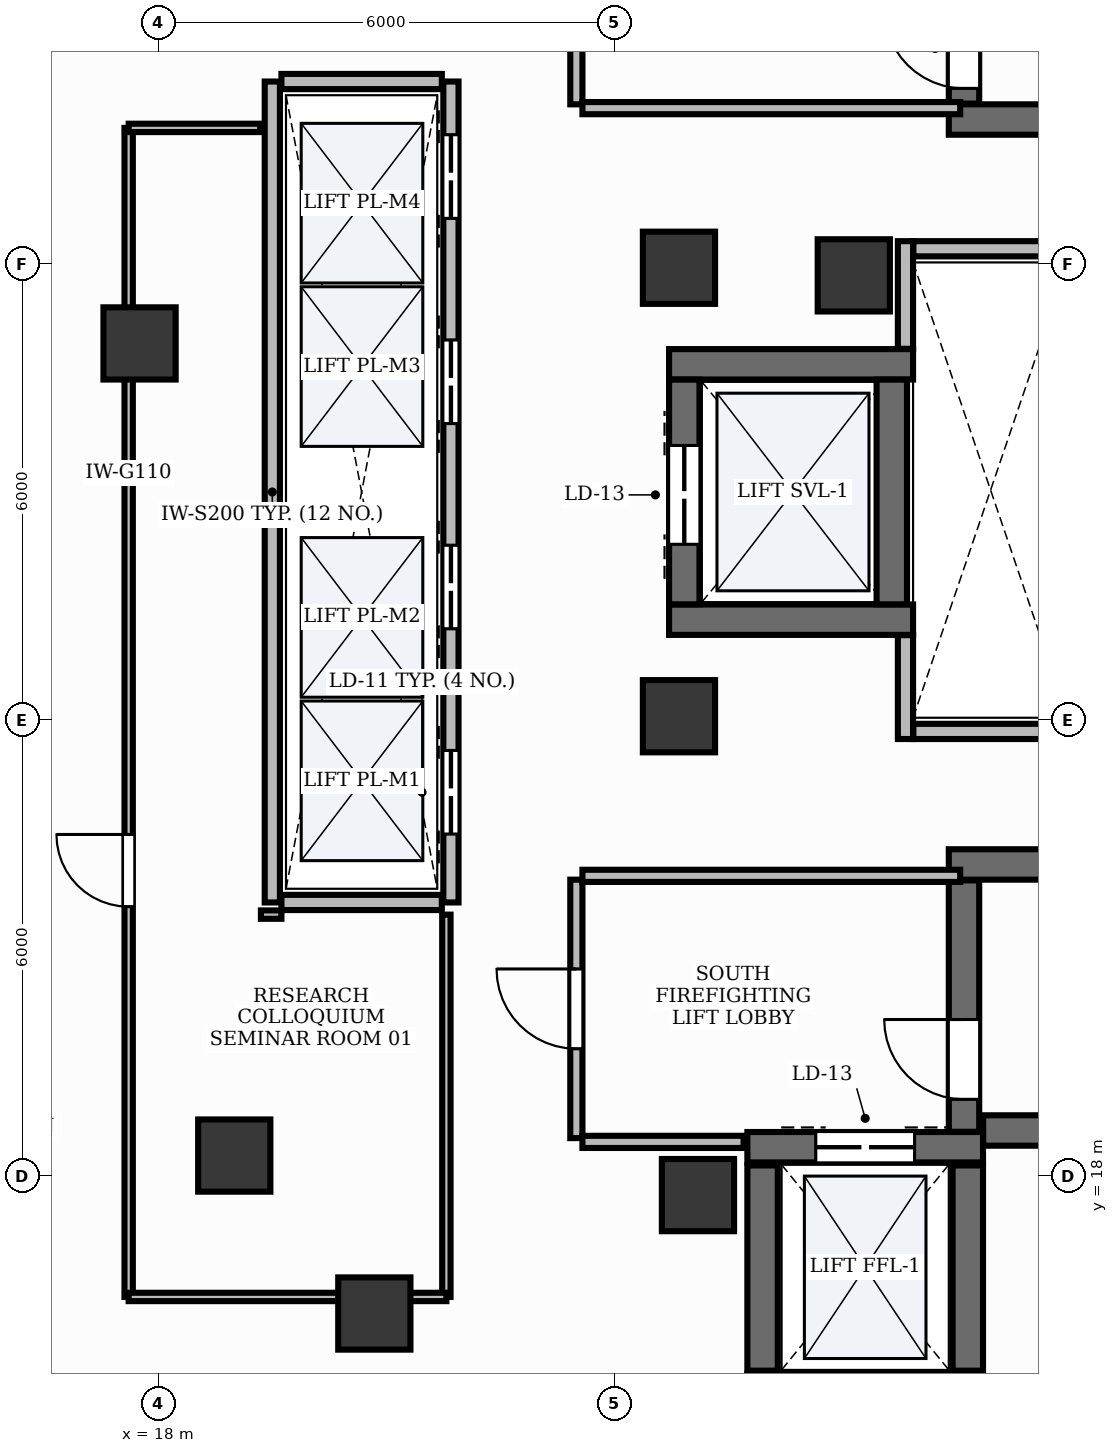
"""IFC4 building model, lengths in metres.
Left out: names, types, materials, properties, quantities, classifications, styles, units other than length and angle.
Written with IfcOpenShell. Run it as: python <this file> out.ifc"""

import sys

from ifc_helpers import new_model, si_unit, direction, frame, frame_2d, origin, origin_2d, place, context, subcontext, project, spatial, rectangle, extrude, element, fill, save


model = new_model("IFC4")
c1 = context("Model", 3, precision=1e-05, world=origin(), true_north=direction((0.0, 1.0)))
c2 = subcontext(c1, "Body", "Model", "MODEL_VIEW")
j1 = project(units=[si_unit("LENGTHUNIT", "METRE"), si_unit("PLANEANGLEUNIT", "RADIAN")], contexts=[c1])
p1 = place(None, origin())
s1 = spatial("IfcSite", under=j1, at=p1, CompositionType="ELEMENT")
p2 = place(p1, origin())
s2 = spatial("IfcBuilding", under=s1, at=p2, CompositionType="ELEMENT")
p3 = place(p2, frame((0.0, 0.0, 171.0)))
s3 = spatial("IfcBuildingStorey", under=s2, at=p3, CompositionType="ELEMENT", Elevation=171.0)
p4 = place(p3, frame((28.4, 31.9, 0.0), z_axis=(0.0, 0.0, 1.0), x_axis=(1.0, 0.0, 0.0)))
e1 = element("IfcWall", 1, at=p4, inside=s3, PredefinedType="SHEAR", context=c2, shape_type="SweptSolid", body=[
    extrude(rectangle(XDim=8.65, YDim=0.4, at=frame_2d((4.325, 0.0))), origin(), (0.0, 0.0, 1.0), 3.9),
])
p5 = place(p3, frame((28.6, 32.11, 0.0), z_axis=(0.0, 0.0, 1.0), x_axis=(0.0, 1.0, 0.0)))
e2 = element("IfcWall", 2, at=p5, inside=s3, PredefinedType="SHEAR", context=c2, shape_type="SweptSolid", body=[
    extrude(rectangle(XDim=3.308, YDim=0.4, at=frame_2d((1.654, 0.0))), origin(), (0.0, 0.0, 1.0), 3.9),
])
p6 = place(p5, frame((0.2, 0.0, 0.0)))
e3 = element("IfcOpeningElement", 3, at=p6, cuts=e2, PredefinedType="OPENING", context=c2, shape_type="SweptSolid", body=[
    extrude(rectangle(XDim=1.05, YDim=2.15, at=frame_2d((0.525, 1.075))), frame((0.0, 0.215, 0.0), z_axis=(0.0, -1.0, 0.0), x_axis=(1.0, 0.0, 0.0)), (0.0, 0.0, 1.0), 0.43),
])
p7 = place(p3, frame((28.852, 18.6, 0.0), z_axis=(0.0, 0.0, 1.0), x_axis=(1.0, 0.0, 0.0)))
e4 = element("IfcWall", 4, at=p7, inside=s3, PredefinedType="SHEAR", context=c2, shape_type="SweptSolid", body=[
    extrude(rectangle(XDim=8.198, YDim=0.4, at=frame_2d((4.099, 0.0))), origin(), (0.0, 0.0, 1.0), 3.9),
])
p8 = place(p3, frame((28.4, 22.1, 0.0), z_axis=(0.0, 0.0, 1.0), x_axis=(1.0, 0.0, 0.0)))
e5 = element("IfcWall", 5, at=p8, inside=s3, PredefinedType="SHEAR", context=c2, shape_type="SweptSolid", body=[
    extrude(rectangle(XDim=8.65, YDim=0.4, at=frame_2d((4.325, 0.0))), origin(), (0.0, 0.0, 1.0), 3.9),
])
p9 = place(p3, frame((28.6, 18.582, 0.0), z_axis=(0.0, 0.0, 1.0), x_axis=(0.0, 1.0, 0.0)))
e6 = element("IfcWall", 6, at=p9, inside=s3, PredefinedType="SHEAR", context=c2, shape_type="SweptSolid", body=[
    extrude(rectangle(XDim=3.308, YDim=0.4, at=frame_2d((1.654, 0.0))), origin(), (0.0, 0.0, 1.0), 3.9),
])
p10 = place(p9, frame((0.428, 0.0, 0.0)))
e7 = element("IfcOpeningElement", 7, at=p10, cuts=e6, PredefinedType="OPENING", context=c2, shape_type="SweptSolid", body=[
    extrude(rectangle(XDim=1.05, YDim=2.15, at=frame_2d((0.525, 1.075))), frame((0.0, 0.215, 0.0), z_axis=(0.0, -1.0, 0.0), x_axis=(1.0, 0.0, 0.0)), (0.0, 0.0, 1.0), 0.43),
])
p11 = place(p3, frame((25.75, 18.38, 0.0), z_axis=(0.0, 0.0, 1.0), x_axis=(1.0, 0.0, 0.0)))
e8 = element("IfcWall", 8, at=p11, inside=s3, PredefinedType="SHEAR", context=c2, shape_type="SweptSolid", body=[
    extrude(rectangle(XDim=3.1, YDim=0.4, at=frame_2d((1.55, 0.0))), origin(), (0.0, 0.0, 1.0), 3.9),
])
p12 = place(p11, frame((0.9, 0.0, 0.0)))
e9 = element("IfcOpeningElement", 9, at=p12, cuts=e8, PredefinedType="OPENING", context=c2, shape_type="SweptSolid", body=[
    extrude(rectangle(XDim=1.3, YDim=2.2, at=frame_2d((0.65, 1.1))), frame((0.0, 0.215, 0.0), z_axis=(0.0, -1.0, 0.0), x_axis=(1.0, 0.0, 0.0)), (0.0, 0.0, 1.0), 0.43),
])
for number, where, z_axis, x_axis in (
    (10, (25.95, 15.44, 0.0), (0.0, 0.0, 1.0), (0.0, 1.0, 0.0)),
    (11, (28.65, 15.44, 0.0), (0.0, 0.0, 1.0), (0.0, 1.0, 0.0)),
):
    element("IfcWall", number, at=place(p3, frame(where, z_axis=z_axis, x_axis=x_axis)), inside=s3, PredefinedType="SHEAR", context=c2, shape_type="SweptSolid", body=[
        extrude(rectangle(XDim=2.7, YDim=0.4, at=frame_2d((1.35, 0.0))), origin(), (0.0, 0.0, 1.0), 3.9),
    ])
for number, where, z_axis, x_axis in (
    (12, (24.72, 28.68, 0.0), (0.0, 0.0, 1.0), (1.0, 0.0, 0.0)),
    (13, (24.72, 25.32, 0.0), (0.0, 0.0, 1.0), (1.0, 0.0, 0.0)),
):
    element("IfcWall", number, at=place(p3, frame(where, z_axis=z_axis, x_axis=x_axis)), inside=s3, PredefinedType="SHEAR", context=c2, shape_type="SweptSolid", body=[
        extrude(rectangle(XDim=3.21, YDim=0.4, at=frame_2d((1.605, 0.0))), origin(), (0.0, 0.0, 1.0), 3.9),
    ])
p13 = place(p3, frame((24.92, 25.522, 0.0), z_axis=(0.0, 0.0, 1.0), x_axis=(0.0, 1.0, 0.0)))
e14 = element("IfcWall", 14, at=p13, inside=s3, PredefinedType="SHEAR", context=c2, shape_type="SweptSolid", body=[
    extrude(rectangle(XDim=2.956, YDim=0.4, at=frame_2d((1.478, 0.0))), origin(), (0.0, 0.0, 1.0), 3.9),
])
p14 = place(p13, frame((0.79, 0.0, 0.0)))
e15 = element("IfcOpeningElement", 15, at=p14, cuts=e14, PredefinedType="OPENING", context=c2, shape_type="SweptSolid", body=[
    extrude(rectangle(XDim=1.3, YDim=2.2, at=frame_2d((0.65, 1.1))), frame((0.0, 0.215, 0.0), z_axis=(0.0, -1.0, 0.0), x_axis=(1.0, 0.0, 0.0)), (0.0, 0.0, 1.0), 0.43),
])
p15 = place(p3, frame((27.65, 25.522, 0.0), z_axis=(0.0, 0.0, 1.0), x_axis=(0.0, 1.0, 0.0)))
e16 = element("IfcWall", 16, at=p15, inside=s3, PredefinedType="SHEAR", context=c2, shape_type="SweptSolid", body=[
    extrude(rectangle(XDim=2.956, YDim=0.4, at=frame_2d((1.478, 0.0))), origin(), (0.0, 0.0, 1.0), 3.9),
])
for number, where, z_axis, x_axis in (
    (17, (24.85, 29.95, -0.0), (0.0, 0.0, 1.0), (1.0, 0.0, 0.0)),
    (18, (27.15, 29.85, -0.0), (0.0, 0.0, 1.0), (1.0, 0.0, 0.0)),
    (19, (24.85, 24.05, -0.0), (0.0, 0.0, 1.0), (1.0, 0.0, 0.0)),
    (20, (25.1, 17.75, -0.0), (0.0, 0.0, 1.0), (1.0, 0.0, 0.0)),
):
    element("IfcColumn", number, at=place(p3, frame(where, z_axis=z_axis, x_axis=x_axis)), inside=s3, PredefinedType="PILASTER", context=c2, shape_type="SweptSolid", body=[
        extrude(rectangle(XDim=0.95, YDim=0.95, at=origin_2d()), origin(), (0.0, 0.0, 1.0), 3.901),
    ])
for number, where, z_axis, x_axis in (
    (21, (17.753, 28.955, -0.0), (0.0, 0.0, 1.0), (1.0, 0.0, 0.0)),
    (22, (19.0, 18.27, -0.0), (0.0, 0.0, 1.0), (1.0, 0.0, 0.0)),
    (23, (20.842, 16.192, -0.0), (0.0, 0.0, 1.0), (1.0, 0.0, 0.0)),
):
    element("IfcColumn", number, at=place(p3, frame(where, z_axis=z_axis, x_axis=x_axis)), inside=s3, PredefinedType="COLUMN", context=c2, shape_type="SweptSolid", body=[
        extrude(rectangle(XDim=0.95, YDim=0.95, at=origin_2d()), origin(), (0.0, 0.0, 1.0), 3.901),
    ])
p16 = place(p3, frame((19.5, 21.6, 0.0), z_axis=(0.0, 0.0, 1.0), x_axis=(0.0, 1.0, 0.0)))
e24 = element("IfcWall", 24, at=p16, inside=s3, PredefinedType="PARTITIONING", context=c2, shape_type="SweptSolid", body=[
    extrude(rectangle(XDim=10.8, YDim=0.2, at=frame_2d((5.4, 0.0))), origin(), (0.0, 0.0, 1.0), 2.91),
])
p17 = place(p3, frame((21.85, 21.6, 0.0), z_axis=(0.0, 0.0, 1.0), x_axis=(0.0, 1.0, 0.0)))
e25 = element("IfcWall", 25, at=p17, inside=s3, PredefinedType="PARTITIONING", context=c2, shape_type="SweptSolid", body=[
    extrude(rectangle(XDim=10.8, YDim=0.2, at=frame_2d((5.4, 0.0))), origin(), (0.0, 0.0, 1.0), 2.91),
])
p18 = place(p17, frame((0.9, 0.0, 0.0)))
e26 = element("IfcOpeningElement", 26, at=p18, cuts=e25, PredefinedType="OPENING", context=c2, shape_type="SweptSolid", body=[
    extrude(rectangle(XDim=1.1, YDim=2.2, at=frame_2d((0.55, 1.1))), frame((0.0, 0.115, 0.0), z_axis=(0.0, -1.0, 0.0), x_axis=(1.0, 0.0, 0.0)), (0.0, 0.0, 1.0), 0.23),
])
p19 = place(p17, frame((3.6, 0.0, 0.0)))
e27 = element("IfcOpeningElement", 27, at=p19, cuts=e25, PredefinedType="OPENING", context=c2, shape_type="SweptSolid", body=[
    extrude(rectangle(XDim=1.1, YDim=2.2, at=frame_2d((0.55, 1.1))), frame((0.0, 0.115, 0.0), z_axis=(0.0, -1.0, 0.0), x_axis=(1.0, 0.0, 0.0)), (0.0, 0.0, 1.0), 0.23),
])
p20 = place(p17, frame((6.3, 0.0, 0.0)))
e28 = element("IfcOpeningElement", 28, at=p20, cuts=e25, PredefinedType="OPENING", context=c2, shape_type="SweptSolid", body=[
    extrude(rectangle(XDim=1.1, YDim=2.2, at=frame_2d((0.55, 1.1))), frame((0.0, 0.115, 0.0), z_axis=(0.0, -1.0, 0.0), x_axis=(1.0, 0.0, 0.0)), (0.0, 0.0, 1.0), 0.23),
])
p21 = place(p17, frame((9.0, 0.0, 0.0)))
e29 = element("IfcOpeningElement", 29, at=p21, cuts=e25, PredefinedType="OPENING", context=c2, shape_type="SweptSolid", body=[
    extrude(rectangle(XDim=1.1, YDim=2.2, at=frame_2d((0.55, 1.1))), frame((0.0, 0.115, 0.0), z_axis=(0.0, -1.0, 0.0), x_axis=(1.0, 0.0, 0.0)), (0.0, 0.0, 1.0), 0.23),
])
for number, where, z_axis, x_axis in (
    (30, (19.62, 21.6, 0.0), (0.0, 0.0, 1.0), (1.0, 0.0, 0.0)),
    (31, (19.62, 32.4, 0.0), (0.0, 0.0, 1.0), (1.0, 0.0, 0.0)),
):
    element("IfcWall", number, at=place(p3, frame(where, z_axis=z_axis, x_axis=x_axis)), inside=s3, PredefinedType="PARTITIONING", context=c2, shape_type="SweptSolid", body=[
        extrude(rectangle(XDim=2.11, YDim=0.2, at=frame_2d((1.055, 0.0))), origin(), (0.0, 0.0, 1.0), 2.91),
    ])
p22 = place(p3, frame((27.83, 23.75, 0.0), z_axis=(0.0, 0.0, 1.0), x_axis=(0.0, 1.0, 0.0)))
e32 = element("IfcWall", 32, at=p22, inside=s3, PredefinedType="PARTITIONING", context=c2, shape_type="SweptSolid", body=[
    extrude(rectangle(XDim=1.366, YDim=0.2, at=frame_2d((0.683, 0.0))), origin(), (0.0, 0.0, 1.0), 2.91),
])
p23 = place(p3, frame((27.83, 28.884, 0.0), z_axis=(0.0, 0.0, 1.0), x_axis=(0.0, 1.0, 0.0)))
e33 = element("IfcWall", 33, at=p23, inside=s3, PredefinedType="PARTITIONING", context=c2, shape_type="SweptSolid", body=[
    extrude(rectangle(XDim=1.416, YDim=0.2, at=frame_2d((0.708, 0.0))), origin(), (0.0, 0.0, 1.0), 2.91),
])
for number, where, z_axis, x_axis in (
    (34, (27.934, 23.85, 0.0), (0.0, 0.0, 1.0), (1.0, 0.0, 0.0)),
    (35, (27.934, 30.2, 0.0), (0.0, 0.0, 1.0), (1.0, 0.0, 0.0)),
):
    element("IfcWall", number, at=place(p3, frame(where, z_axis=z_axis, x_axis=x_axis)), inside=s3, PredefinedType="PARTITIONING", context=c2, shape_type="SweptSolid", body=[
        extrude(rectangle(XDim=2.096, YDim=0.2, at=frame_2d((1.048, 0.0))), origin(), (0.0, 0.0, 1.0), 2.91),
    ])
p24 = place(p3, frame((23.5, 32.1, 0.0), z_axis=(0.0, 0.0, 1.0), x_axis=(0.0, 1.0, 0.0)))
e36 = element("IfcWall", 36, at=p24, inside=s3, PredefinedType="PARTITIONING", context=c2, shape_type="SweptSolid", body=[
    extrude(rectangle(XDim=3.4, YDim=0.16, at=frame_2d((1.7, 0.0))), origin(), (0.0, 0.0, 1.0), 2.91),
])
p25 = place(p24, frame((1.175, 0.0, 0.0)))
e37 = element("IfcOpeningElement", 37, at=p25, cuts=e36, PredefinedType="OPENING", context=c2, shape_type="SweptSolid", body=[
    extrude(rectangle(XDim=1.05, YDim=2.15, at=frame_2d((0.525, 1.075))), frame((0.0, 0.095, 0.0), z_axis=(0.0, -1.0, 0.0), x_axis=(1.0, 0.0, 0.0)), (0.0, 0.0, 1.0), 0.19),
])
p26 = place(p3, frame((23.5, 18.5, 0.0), z_axis=(0.0, 0.0, 1.0), x_axis=(0.0, 1.0, 0.0)))
e38 = element("IfcWall", 38, at=p26, inside=s3, PredefinedType="PARTITIONING", context=c2, shape_type="SweptSolid", body=[
    extrude(rectangle(XDim=3.4, YDim=0.16, at=frame_2d((1.7, 0.0))), origin(), (0.0, 0.0, 1.0), 2.91),
])
p27 = place(p26, frame((1.175, 0.0, 0.0)))
e39 = element("IfcOpeningElement", 39, at=p27, cuts=e38, PredefinedType="OPENING", context=c2, shape_type="SweptSolid", body=[
    extrude(rectangle(XDim=1.05, YDim=2.15, at=frame_2d((0.525, 1.075))), frame((0.0, 0.095, 0.0), z_axis=(0.0, -1.0, 0.0), x_axis=(1.0, 0.0, 0.0)), (0.0, 0.0, 1.0), 0.19),
])
for number, where, z_axis, x_axis in (
    (40, (23.58, 32.05, 0.0), (0.0, 0.0, 1.0), (1.0, 0.0, 0.0)),
    (41, (23.58, 21.95, 0.0), (0.0, 0.0, 1.0), (1.0, 0.0, 0.0)),
):
    element("IfcWall", number, at=place(p3, frame(where, z_axis=z_axis, x_axis=x_axis)), inside=s3, PredefinedType="PARTITIONING", context=c2, shape_type="SweptSolid", body=[
        extrude(rectangle(XDim=4.97, YDim=0.16, at=frame_2d((2.485, 0.0))), origin(), (0.0, 0.0, 1.0), 2.91),
    ])
p28 = place(p3, frame((23.58, 18.45, 0.0), z_axis=(0.0, 0.0, 1.0), x_axis=(1.0, 0.0, 0.0)))
e42 = element("IfcWall", 42, at=p28, inside=s3, PredefinedType="PARTITIONING", context=c2, shape_type="SweptSolid", body=[
    extrude(rectangle(XDim=2.12, YDim=0.16, at=frame_2d((1.06, 0.0))), origin(), (0.0, 0.0, 1.0), 2.91),
])
p29 = place(p3, frame((17.61, 16.41, 0.0), z_axis=(0.0, 0.0, 1.0), x_axis=(0.0, 1.0, 0.0)))
e43 = element("IfcWall", 43, at=p29, inside=s3, PredefinedType="MOVABLE", context=c2, shape_type="SweptSolid", body=[
    extrude(rectangle(XDim=15.38, YDim=0.11, at=frame_2d((7.69, 0.0))), origin(), (0.0, 0.0, 1.0), 2.91),
])
p30 = place(p29, frame((5.135, 0.0, 0.0)))
e44 = element("IfcOpeningElement", 44, at=p30, cuts=e43, PredefinedType="OPENING", context=c2, shape_type="SweptSolid", body=[
    extrude(rectangle(XDim=0.95, YDim=2.15, at=frame_2d((0.475, 1.075))), frame((0.0, 0.07, 0.0), z_axis=(0.0, -1.0, 0.0), x_axis=(1.0, 0.0, 0.0)), (0.0, 0.0, 1.0), 0.14),
])
p31 = place(p3, frame((19.35, 21.44, 0.0), z_axis=(0.0, 0.0, 1.0), x_axis=(1.0, 0.0, 0.0)))
e45 = element("IfcWall", 45, at=p31, inside=s3, PredefinedType="MOVABLE", context=c2, shape_type="SweptSolid", body=[
    extrude(rectangle(XDim=0.27, YDim=0.11, at=frame_2d((0.135, 0.0))), origin(), (0.0, 0.0, 1.0), 2.91),
])
p32 = place(p3, frame((21.79, 21.44, 0.0), z_axis=(0.0, 0.0, 1.0), x_axis=(0.0, -1.0, 0.0)))
e46 = element("IfcWall", 46, at=p32, inside=s3, PredefinedType="MOVABLE", context=c2, shape_type="SweptSolid", body=[
    extrude(rectangle(XDim=5.03, YDim=0.11, at=frame_2d((2.515, 0.0))), origin(), (0.0, 0.0, 1.0), 2.91),
])
p33 = place(p3, frame((21.79, 16.41, 0.0), z_axis=(0.0, 0.0, 1.0), x_axis=(-1.0, 0.0, 0.0)))
e47 = element("IfcWall", 47, at=p33, inside=s3, PredefinedType="MOVABLE", context=c2, shape_type="SweptSolid", body=[
    extrude(rectangle(XDim=4.18, YDim=0.11, at=frame_2d((2.09, 0.0))), origin(), (0.0, 0.0, 1.0), 2.91),
])
p34 = place(p3, frame((17.61, 31.79, 0.0), z_axis=(0.0, 0.0, 1.0), x_axis=(1.0, 0.0, 0.0)))
e48 = element("IfcWall", 48, at=p34, inside=s3, PredefinedType="MOVABLE", context=c2, shape_type="SweptSolid", body=[
    extrude(rectangle(XDim=1.73, YDim=0.11, at=frame_2d((0.865, 0.0))), origin(), (0.0, 0.0, 1.0), 2.91),
])
p35 = place(p6, origin())
e49 = element("IfcDoor", 49, at=p35, inside=s3, OperationType="SINGLE_SWING_RIGHT", PredefinedType="DOOR", context=c2, shape_type="SweptSolid", body=[
    extrude(rectangle(XDim=1.05, YDim=2.15, at=frame_2d((0.525, 1.075))), frame((0.0, 0.025, 0.0), z_axis=(0.0, -1.0, 0.0), x_axis=(1.0, 0.0, 0.0)), (0.0, 0.0, 1.0), 0.05),
])
fill(e3, e49)
p36 = place(p10, origin())
e50 = element("IfcDoor", 50, at=p36, inside=s3, OperationType="SINGLE_SWING_RIGHT", PredefinedType="DOOR", context=c2, shape_type="SweptSolid", body=[
    extrude(rectangle(XDim=1.05, YDim=2.15, at=frame_2d((0.525, 1.075))), frame((0.0, 0.025, 0.0), z_axis=(0.0, -1.0, 0.0), x_axis=(1.0, 0.0, 0.0)), (0.0, 0.0, 1.0), 0.05),
])
fill(e7, e50)
p37 = place(p18, origin())
e51 = element("IfcDoor", 51, at=p37, inside=s3, OperationType="DOUBLE_DOOR_SLIDING", PredefinedType="DOOR", context=c2, shape_type="SweptSolid", body=[
    extrude(rectangle(XDim=1.1, YDim=2.2, at=frame_2d((0.55, 1.1))), frame((0.0, 0.025, 0.0), z_axis=(0.0, -1.0, 0.0), x_axis=(1.0, 0.0, 0.0)), (0.0, 0.0, 1.0), 0.05),
])
fill(e26, e51)
p38 = place(p19, origin())
e52 = element("IfcDoor", 52, at=p38, inside=s3, OperationType="DOUBLE_DOOR_SLIDING", PredefinedType="DOOR", context=c2, shape_type="SweptSolid", body=[
    extrude(rectangle(XDim=1.1, YDim=2.2, at=frame_2d((0.55, 1.1))), frame((0.0, 0.025, 0.0), z_axis=(0.0, -1.0, 0.0), x_axis=(1.0, 0.0, 0.0)), (0.0, 0.0, 1.0), 0.05),
])
fill(e27, e52)
p39 = place(p20, origin())
e53 = element("IfcDoor", 53, at=p39, inside=s3, OperationType="DOUBLE_DOOR_SLIDING", PredefinedType="DOOR", context=c2, shape_type="SweptSolid", body=[
    extrude(rectangle(XDim=1.1, YDim=2.2, at=frame_2d((0.55, 1.1))), frame((0.0, 0.025, 0.0), z_axis=(0.0, -1.0, 0.0), x_axis=(1.0, 0.0, 0.0)), (0.0, 0.0, 1.0), 0.05),
])
fill(e28, e53)
p40 = place(p21, origin())
e54 = element("IfcDoor", 54, at=p40, inside=s3, OperationType="DOUBLE_DOOR_SLIDING", PredefinedType="DOOR", context=c2, shape_type="SweptSolid", body=[
    extrude(rectangle(XDim=1.1, YDim=2.2, at=frame_2d((0.55, 1.1))), frame((0.0, 0.025, 0.0), z_axis=(0.0, -1.0, 0.0), x_axis=(1.0, 0.0, 0.0)), (0.0, 0.0, 1.0), 0.05),
])
fill(e29, e54)
p41 = place(p12, origin())
e55 = element("IfcDoor", 55, at=p41, inside=s3, OperationType="DOUBLE_DOOR_SLIDING", PredefinedType="DOOR", context=c2, shape_type="SweptSolid", body=[
    extrude(rectangle(XDim=1.3, YDim=2.2, at=frame_2d((0.65, 1.1))), frame((0.0, 0.025, 0.0), z_axis=(0.0, -1.0, 0.0), x_axis=(1.0, 0.0, 0.0)), (0.0, 0.0, 1.0), 0.05),
])
fill(e9, e55)
p42 = place(p14, origin())
e56 = element("IfcDoor", 56, at=p42, inside=s3, OperationType="DOUBLE_DOOR_SLIDING", PredefinedType="DOOR", context=c2, shape_type="SweptSolid", body=[
    extrude(rectangle(XDim=1.3, YDim=2.2, at=frame_2d((0.65, 1.1))), frame((0.0, 0.025, 0.0), z_axis=(0.0, -1.0, 0.0), x_axis=(1.0, 0.0, 0.0)), (0.0, 0.0, 1.0), 0.05),
])
fill(e15, e56)
p43 = place(p27, origin())
e57 = element("IfcDoor", 57, at=p43, inside=s3, OperationType="SINGLE_SWING_RIGHT", PredefinedType="DOOR", context=c2, shape_type="SweptSolid", body=[
    extrude(rectangle(XDim=1.05, YDim=2.15, at=frame_2d((0.525, 1.075))), frame((0.0, 0.025, 0.0), z_axis=(0.0, -1.0, 0.0), x_axis=(1.0, 0.0, 0.0)), (0.0, 0.0, 1.0), 0.05),
])
fill(e39, e57)
p44 = place(p30, origin())
e58 = element("IfcDoor", 58, at=p44, inside=s3, OperationType="SINGLE_SWING_RIGHT", PredefinedType="DOOR", context=c2, shape_type="SweptSolid", body=[
    extrude(rectangle(XDim=0.95, YDim=2.15, at=frame_2d((0.475, 1.075))), frame((0.0, 0.025, 0.0), z_axis=(0.0, -1.0, 0.0), x_axis=(1.0, 0.0, 0.0)), (0.0, 0.0, 1.0), 0.05),
])
fill(e44, e58)
save(model, sys.argv[1])
